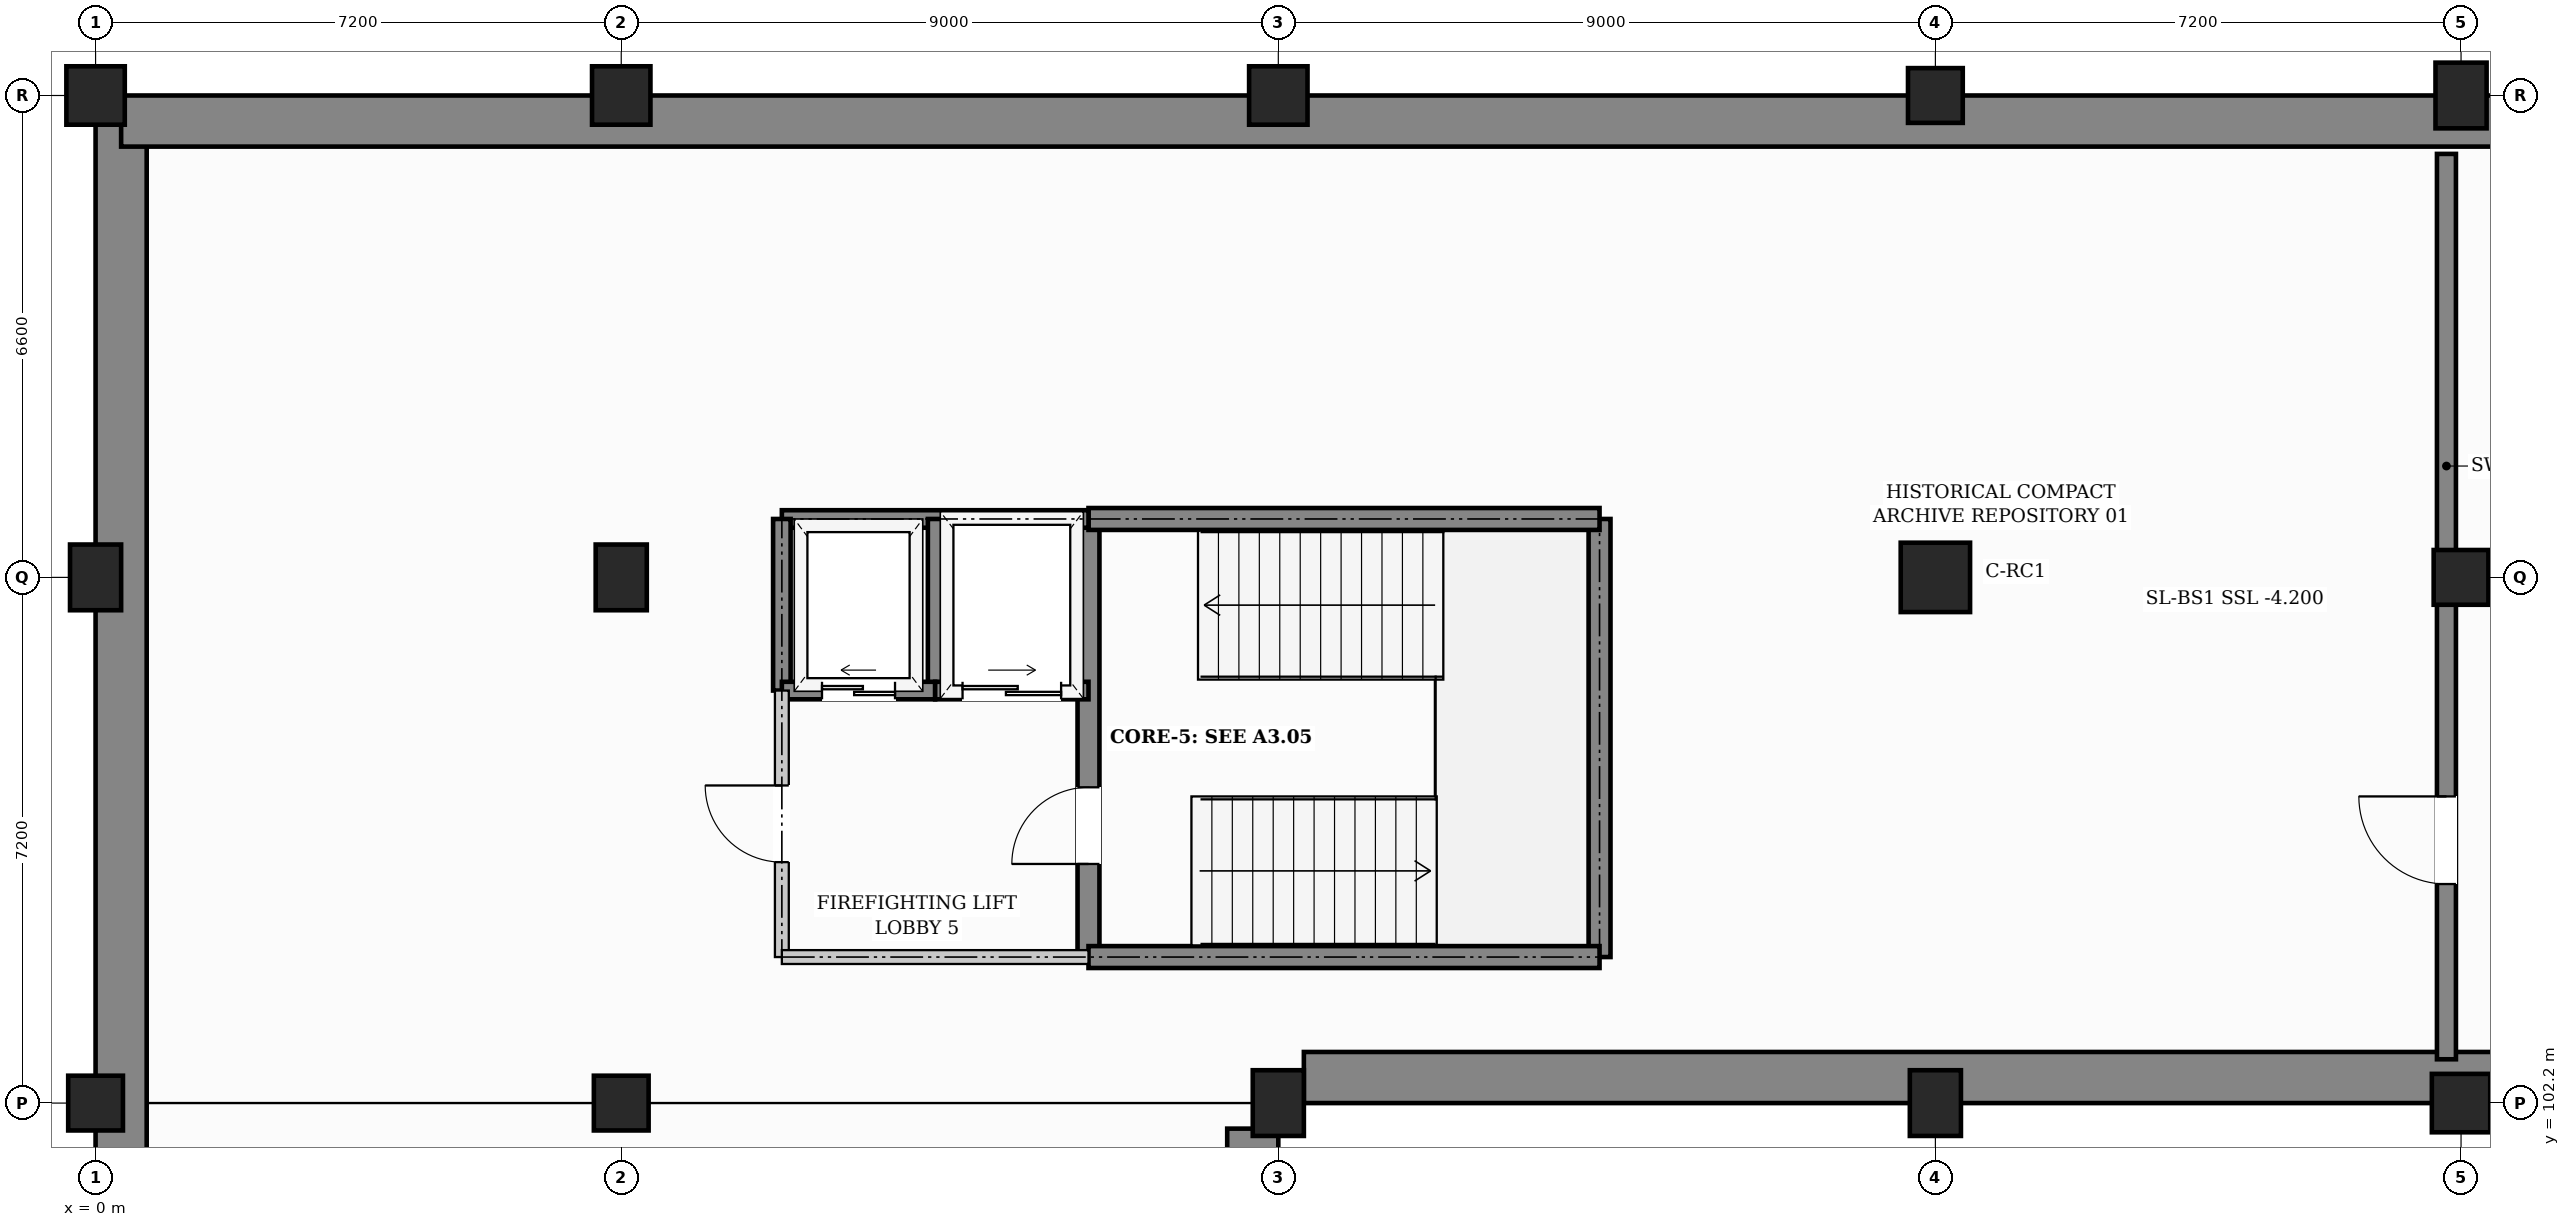
"""IFC4 building model, lengths in metres.
Left out: names, types, materials, properties, quantities, classifications, styles, units other than length and angle.
Written with IfcOpenShell. Run it as: python <this file> out.ifc"""

import sys

from ifc_helpers import new_model, si_unit, direction, frame, frame_2d, origin, origin_2d, place, context, subcontext, project, spatial, rectangle, extrude, element, fill, save


model = new_model("IFC4")
c1 = context("Model", 3, precision=1e-05, world=origin(), true_north=direction((0.0, 1.0)))
c2 = subcontext(c1, "Body", "Model", "MODEL_VIEW")
j1 = project(units=[si_unit("LENGTHUNIT", "METRE"), si_unit("PLANEANGLEUNIT", "RADIAN")], contexts=[c1])
p1 = place(None, origin())
s1 = spatial("IfcSite", under=j1, at=p1, CompositionType="ELEMENT")
p2 = place(p1, origin())
s2 = spatial("IfcBuilding", under=s1, at=p2, CompositionType="ELEMENT")
p3 = place(p2, frame((0.0, 0.0, -4.2)))
s3 = spatial("IfcBuildingStorey", under=s2, at=p3, CompositionType="ELEMENT", Elevation=-4.2)
p4 = place(p3, frame((0.0, 102.2, 0.0), z_axis=(0.0, 0.0, 1.0), x_axis=(1.0, 0.0, 0.0)))
e1 = element("IfcColumn", 1, at=p4, inside=s3, PredefinedType="COLUMN", context=c2, shape_type="SweptSolid", body=[
    extrude(rectangle(XDim=0.75, YDim=0.75, at=origin_2d()), origin(), (0.0, 0.0, 1.0), 4.2),
])
p5 = place(p3, frame((0.0, 109.4, 0.0), z_axis=(0.0, 0.0, 1.0), x_axis=(1.0, 0.0, 0.0)))
e2 = element("IfcColumn", 2, at=p5, inside=s3, PredefinedType="COLUMN", context=c2, shape_type="SweptSolid", body=[
    extrude(rectangle(XDim=0.7, YDim=0.9, at=origin_2d()), origin(), (0.0, 0.0, 1.0), 4.2),
])
p6 = place(p3, frame((0.0, 116.0, 0.0), z_axis=(0.0, 0.0, 1.0), x_axis=(1.0, 0.0, 0.0)))
e3 = element("IfcColumn", 3, at=p6, inside=s3, PredefinedType="COLUMN", context=c2, shape_type="SweptSolid", body=[
    extrude(rectangle(XDim=0.8, YDim=0.8, at=origin_2d()), origin(), (0.0, 0.0, 1.0), 4.2),
])
p7 = place(p3, frame((7.2, 102.2, 0.0), z_axis=(0.0, 0.0, 1.0), x_axis=(1.0, 0.0, 0.0)))
e4 = element("IfcColumn", 4, at=p7, inside=s3, PredefinedType="COLUMN", context=c2, shape_type="SweptSolid", body=[
    extrude(rectangle(XDim=0.75, YDim=0.75, at=origin_2d()), origin(), (0.0, 0.0, 1.0), 4.2),
])
p8 = place(p3, frame((7.2, 109.4, 0.0), z_axis=(0.0, 0.0, 1.0), x_axis=(1.0, 0.0, 0.0)))
e5 = element("IfcColumn", 5, at=p8, inside=s3, PredefinedType="COLUMN", context=c2, shape_type="SweptSolid", body=[
    extrude(rectangle(XDim=0.7, YDim=0.9, at=origin_2d()), origin(), (0.0, 0.0, 1.0), 4.2),
])
p9 = place(p3, frame((7.2, 116.0, 0.0), z_axis=(0.0, 0.0, 1.0), x_axis=(1.0, 0.0, 0.0)))
e6 = element("IfcColumn", 6, at=p9, inside=s3, PredefinedType="COLUMN", context=c2, shape_type="SweptSolid", body=[
    extrude(rectangle(XDim=0.8, YDim=0.8, at=origin_2d()), origin(), (0.0, 0.0, 1.0), 4.2),
])
p10 = place(p3, frame((16.2, 102.2, 0.0), z_axis=(0.0, 0.0, 1.0), x_axis=(1.0, 0.0, 0.0)))
e7 = element("IfcColumn", 7, at=p10, inside=s3, PredefinedType="COLUMN", context=c2, shape_type="SweptSolid", body=[
    extrude(rectangle(XDim=0.7, YDim=0.9, at=origin_2d()), origin(), (0.0, 0.0, 1.0), 4.2),
])
p11 = place(p3, frame((16.2, 116.0, 0.0), z_axis=(0.0, 0.0, 1.0), x_axis=(1.0, 0.0, 0.0)))
e8 = element("IfcColumn", 8, at=p11, inside=s3, PredefinedType="COLUMN", context=c2, shape_type="SweptSolid", body=[
    extrude(rectangle(XDim=0.8, YDim=0.8, at=origin_2d()), origin(), (0.0, 0.0, 1.0), 4.2),
])
p12 = place(p3, frame((25.2, 102.2, 0.0), z_axis=(0.0, 0.0, 1.0), x_axis=(1.0, 0.0, 0.0)))
e9 = element("IfcColumn", 9, at=p12, inside=s3, PredefinedType="COLUMN", context=c2, shape_type="SweptSolid", body=[
    extrude(rectangle(XDim=0.7, YDim=0.9, at=origin_2d()), origin(), (0.0, 0.0, 1.0), 4.2),
])
p13 = place(p3, frame((25.2, 109.4, 0.0), z_axis=(0.0, 0.0, 1.0), x_axis=(1.0, 0.0, 0.0)))
e10 = element("IfcColumn", 10, at=p13, inside=s3, PredefinedType="COLUMN", context=c2, shape_type="SweptSolid", body=[
    extrude(rectangle(XDim=0.95, YDim=0.95, at=origin_2d()), origin(), (0.0, 0.0, 1.0), 4.2),
])
p14 = place(p3, frame((25.2, 116.0, 0.0), z_axis=(0.0, 0.0, 1.0), x_axis=(1.0, 0.0, 0.0)))
e11 = element("IfcColumn", 11, at=p14, inside=s3, PredefinedType="COLUMN", context=c2, shape_type="SweptSolid", body=[
    extrude(rectangle(XDim=0.75, YDim=0.75, at=origin_2d()), origin(), (0.0, 0.0, 1.0), 4.2),
])
p15 = place(p3, frame((32.4, 102.2, 0.0), z_axis=(0.0, 0.0, 1.0), x_axis=(1.0, 0.0, 0.0)))
e12 = element("IfcColumn", 12, at=p15, inside=s3, PredefinedType="COLUMN", context=c2, shape_type="SweptSolid", body=[
    extrude(rectangle(XDim=0.8, YDim=0.8, at=origin_2d()), origin(), (0.0, 0.0, 1.0), 4.2),
])
p16 = place(p3, frame((32.4, 109.4, 0.0), z_axis=(0.0, 0.0, 1.0), x_axis=(1.0, 0.0, 0.0)))
e13 = element("IfcColumn", 13, at=p16, inside=s3, PredefinedType="COLUMN", context=c2, shape_type="SweptSolid", body=[
    extrude(rectangle(XDim=0.75, YDim=0.75, at=origin_2d()), origin(), (0.0, 0.0, 1.0), 4.2),
])
p17 = place(p3, frame((32.4, 116.0, 0.0), z_axis=(0.0, 0.0, 1.0), x_axis=(1.0, 0.0, 0.0)))
e14 = element("IfcColumn", 14, at=p17, inside=s3, PredefinedType="COLUMN", context=c2, shape_type="SweptSolid", body=[
    extrude(rectangle(XDim=0.7, YDim=0.9, at=origin_2d()), origin(), (0.0, 0.0, 1.0), 4.2),
])
p18 = place(p3, frame((0.35, 0.35, 0.0), z_axis=(0.0, 0.0, 1.0), x_axis=(0.0, 1.0, 0.0)))
e15 = element("IfcWall", 15, at=p18, inside=s3, PredefinedType="SOLIDWALL", context=c2, shape_type="SweptSolid", body=[
    extrude(rectangle(XDim=115.3, YDim=0.7, at=frame_2d((57.65, 0.0))), origin(), (0.0, 0.0, 1.0), 3.84),
])
p19 = place(p3, frame((0.35, 115.65, 0.0), z_axis=(0.0, 0.0, 1.0), x_axis=(1.0, 0.0, 0.0)))
e16 = element("IfcWall", 16, at=p19, inside=s3, PredefinedType="SOLIDWALL", context=c2, shape_type="SweptSolid", body=[
    extrude(rectangle(XDim=65.875, YDim=0.7, at=frame_2d((32.938, 0.0))), origin(), (0.0, 0.0, 1.0), 3.84),
])
p20 = place(p3, frame((57.25, 102.55, 0.0), z_axis=(0.0, 0.0, 1.0), x_axis=(-1.0, 0.0, 0.0)))
e17 = element("IfcWall", 17, at=p20, inside=s3, PredefinedType="SOLIDWALL", context=c2, shape_type="SweptSolid", body=[
    extrude(rectangle(XDim=40.7, YDim=0.7, at=frame_2d((20.35, 0.0))), origin(), (0.0, 0.0, 1.0), 3.84),
])
p21 = place(p3, frame((15.85, 101.85, 0.0), z_axis=(0.0, 0.0, 1.0), x_axis=(0.0, -1.0, 0.0)))
e18 = element("IfcWall", 18, at=p21, inside=s3, PredefinedType="SOLIDWALL", context=c2, shape_type="SweptSolid", body=[
    extrude(rectangle(XDim=38.9, YDim=0.7, at=frame_2d((19.45, 0.0))), origin(), (0.0, 0.0, 1.0), 3.84),
])
p22 = place(p3, frame((13.6, 104.2, 0.0), z_axis=(0.0, 0.0, 1.0), x_axis=(0.0, 1.0, 0.0)))
e19 = element("IfcWall", 19, at=p22, inside=s3, PredefinedType="SHEAR", context=c2, shape_type="SweptSolid", body=[
    extrude(rectangle(XDim=6.0, YDim=0.3, at=frame_2d((3.0, 0.0))), origin(), (0.0, 0.0, 1.0), 3.84),
])
p23 = place(p22, frame((1.275, 0.0, 0.0)))
e20 = element("IfcOpeningElement", 20, at=p23, cuts=e19, PredefinedType="OPENING", context=c2, shape_type="SweptSolid", body=[
    extrude(rectangle(XDim=1.05, YDim=2.15, at=frame_2d((0.525, 1.075))), frame((0.0, 0.16, 0.0), z_axis=(0.0, -1.0, 0.0), x_axis=(1.0, 0.0, 0.0)), (0.0, 0.0, 1.0), 0.32),
])
p24 = place(p3, frame((20.6, 104.2, 0.0), z_axis=(0.0, 0.0, 1.0), x_axis=(0.0, 1.0, 0.0)))
e21 = element("IfcWall", 21, at=p24, inside=s3, PredefinedType="SHEAR", context=c2, shape_type="SweptSolid", body=[
    extrude(rectangle(XDim=6.0, YDim=0.3, at=frame_2d((3.0, 0.0))), origin(), (0.0, 0.0, 1.0), 3.84),
])
for number, where, z_axis, x_axis in (
    (22, (13.6, 104.2, 0.0), (0.0, 0.0, 1.0), (1.0, 0.0, 0.0)),
    (23, (13.6, 110.2, 0.0), (0.0, 0.0, 1.0), (1.0, 0.0, 0.0)),
):
    element("IfcWall", number, at=place(p3, frame(where, z_axis=z_axis, x_axis=x_axis)), inside=s3, PredefinedType="SHEAR", context=c2, shape_type="SweptSolid", body=[
        extrude(rectangle(XDim=7.0, YDim=0.3, at=frame_2d((3.5, 0.0))), origin(), (0.0, 0.0, 1.0), 3.84),
    ])
p25 = place(p3, frame((9.4, 110.2, 0.0), z_axis=(0.0, 0.0, 1.0), x_axis=(1.0, 0.0, 0.0)))
e24 = element("IfcWall", 24, at=p25, inside=s3, PredefinedType="SHEAR", context=c2, shape_type="SweptSolid", body=[
    extrude(rectangle(XDim=4.2, YDim=0.24, at=frame_2d((2.1, 0.0))), origin(), (0.0, 0.0, 1.0), 3.84),
])
p26 = place(p3, frame((9.4, 107.85, 0.0), z_axis=(0.0, 0.0, 1.0), x_axis=(0.0, 1.0, 0.0)))
e25 = element("IfcWall", 25, at=p26, inside=s3, PredefinedType="SHEAR", context=c2, shape_type="SweptSolid", body=[
    extrude(rectangle(XDim=2.35, YDim=0.24, at=frame_2d((1.175, 0.0))), origin(), (0.0, 0.0, 1.0), 3.84),
])
p27 = place(p3, frame((11.5, 107.85, 0.0), z_axis=(0.0, 0.0, 1.0), x_axis=(0.0, 1.0, 0.0)))
e26 = element("IfcWall", 26, at=p27, inside=s3, PredefinedType="SHEAR", context=c2, shape_type="SweptSolid", body=[
    extrude(rectangle(XDim=2.35, YDim=0.2, at=frame_2d((1.175, 0.0))), origin(), (0.0, 0.0, 1.0), 3.84),
])
p28 = place(p3, frame((9.4, 107.85, 0.0), z_axis=(0.0, 0.0, 1.0), x_axis=(1.0, 0.0, 0.0)))
e27 = element("IfcWall", 27, at=p28, inside=s3, PredefinedType="SHEAR", context=c2, shape_type="SweptSolid", body=[
    extrude(rectangle(XDim=2.1, YDim=0.24, at=frame_2d((1.05, 0.0))), origin(), (0.0, 0.0, 1.0), 3.84),
])
p29 = place(p28, frame((0.55, 0.0, 0.0)))
e28 = element("IfcOpeningElement", 28, at=p29, cuts=e27, PredefinedType="OPENING", context=c2, shape_type="SweptSolid", body=[
    extrude(rectangle(XDim=1.0, YDim=2.1, at=frame_2d((0.5, 1.05))), frame((0.0, 0.13, 0.0), z_axis=(0.0, -1.0, 0.0), x_axis=(1.0, 0.0, 0.0)), (0.0, 0.0, 1.0), 0.26),
])
p30 = place(p3, frame((11.5, 107.85, 0.0), z_axis=(0.0, 0.0, 1.0), x_axis=(1.0, 0.0, 0.0)))
e29 = element("IfcWall", 29, at=p30, inside=s3, PredefinedType="SHEAR", context=c2, shape_type="SweptSolid", body=[
    extrude(rectangle(XDim=2.1, YDim=0.24, at=frame_2d((1.05, 0.0))), origin(), (0.0, 0.0, 1.0), 3.84),
])
p31 = place(p30, frame((0.375, 0.0, 0.0)))
e30 = element("IfcOpeningElement", 30, at=p31, cuts=e29, PredefinedType="OPENING", context=c2, shape_type="SweptSolid", body=[
    extrude(rectangle(XDim=1.35, YDim=2.2, at=frame_2d((0.675, 1.1))), frame((0.0, 0.13, 0.0), z_axis=(0.0, -1.0, 0.0), x_axis=(1.0, 0.0, 0.0)), (0.0, 0.0, 1.0), 0.26),
])
p32 = place(p3, frame((9.4, 104.2, 0.0), z_axis=(0.0, 0.0, 1.0), x_axis=(0.0, 1.0, 0.0)))
e31 = element("IfcWall", 31, at=p32, inside=s3, PredefinedType="PARTITIONING", context=c2, shape_type="SweptSolid", body=[
    extrude(rectangle(XDim=3.65, YDim=0.19, at=frame_2d((1.825, 0.0))), origin(), (0.0, 0.0, 1.0), 3.84),
])
p33 = place(p32, frame((1.3, 0.0, 0.0)))
e32 = element("IfcOpeningElement", 32, at=p33, cuts=e31, PredefinedType="OPENING", context=c2, shape_type="SweptSolid", body=[
    extrude(rectangle(XDim=1.05, YDim=2.15, at=frame_2d((0.525, 1.075))), frame((0.0, 0.105, 0.0), z_axis=(0.0, -1.0, 0.0), x_axis=(1.0, 0.0, 0.0)), (0.0, 0.0, 1.0), 0.21),
])
p34 = place(p3, frame((9.4, 104.2, 0.0), z_axis=(0.0, 0.0, 1.0), x_axis=(1.0, 0.0, 0.0)))
e33 = element("IfcWall", 33, at=p34, inside=s3, PredefinedType="PARTITIONING", context=c2, shape_type="SweptSolid", body=[
    extrude(rectangle(XDim=4.2, YDim=0.19, at=frame_2d((2.1, 0.0))), origin(), (0.0, 0.0, 1.0), 3.84),
])
p35 = place(p3, frame((32.2, 102.8, 0.0), z_axis=(0.0, 0.0, 1.0), x_axis=(0.0, 1.0, 0.0)))
e34 = element("IfcWall", 34, at=p35, inside=s3, PredefinedType="SOLIDWALL", context=c2, shape_type="SweptSolid", body=[
    extrude(rectangle(XDim=12.4, YDim=0.26, at=frame_2d((6.2, 0.0))), origin(), (0.0, 0.0, 1.0), 3.14),
])
p36 = place(p35, frame((2.4, 0.0, 0.0)))
e35 = element("IfcOpeningElement", 35, at=p36, cuts=e34, PredefinedType="OPENING", context=c2, shape_type="SweptSolid", body=[
    extrude(rectangle(XDim=1.2, YDim=2.2, at=frame_2d((0.6, 1.1))), frame((0.0, 0.14, 0.0), z_axis=(0.0, -1.0, 0.0), x_axis=(1.0, 0.0, 0.0)), (0.0, 0.0, 1.0), 0.28),
])
p37 = place(p23, origin())
e36 = element("IfcDoor", 36, at=p37, inside=s3, OperationType="SINGLE_SWING_LEFT", PredefinedType="DOOR", context=c2, shape_type="SweptSolid", body=[
    extrude(rectangle(XDim=1.05, YDim=2.15, at=frame_2d((0.525, 1.075))), frame((0.0, 0.025, 0.0), z_axis=(0.0, -1.0, 0.0), x_axis=(1.0, 0.0, 0.0)), (0.0, 0.0, 1.0), 0.05),
])
fill(e20, e36)
p38 = place(p29, origin())
e37 = element("IfcDoor", 37, at=p38, inside=s3, OperationType="SLIDING_TO_LEFT", PredefinedType="DOOR", context=c2, shape_type="SweptSolid", body=[
    extrude(rectangle(XDim=1.0, YDim=2.1, at=frame_2d((0.5, 1.05))), frame((0.0, 0.025, 0.0), z_axis=(0.0, -1.0, 0.0), x_axis=(1.0, 0.0, 0.0)), (0.0, 0.0, 1.0), 0.05),
])
fill(e28, e37)
p39 = place(p31, origin())
e38 = element("IfcDoor", 38, at=p39, inside=s3, OperationType="SLIDING_TO_RIGHT", PredefinedType="DOOR", context=c2, shape_type="SweptSolid", body=[
    extrude(rectangle(XDim=1.35, YDim=2.2, at=frame_2d((0.675, 1.1))), frame((0.0, 0.025, 0.0), z_axis=(0.0, -1.0, 0.0), x_axis=(1.0, 0.0, 0.0)), (0.0, 0.0, 1.0), 0.05),
])
fill(e30, e38)
p40 = place(p33, origin())
e39 = element("IfcDoor", 39, at=p40, inside=s3, OperationType="SINGLE_SWING_RIGHT", PredefinedType="DOOR", context=c2, shape_type="SweptSolid", body=[
    extrude(rectangle(XDim=1.05, YDim=2.15, at=frame_2d((0.525, 1.075))), frame((0.0, 0.025, 0.0), z_axis=(0.0, -1.0, 0.0), x_axis=(1.0, 0.0, 0.0)), (0.0, 0.0, 1.0), 0.05),
])
fill(e32, e39)
p41 = place(p36, origin())
e40 = element("IfcDoor", 40, at=p41, inside=s3, OperationType="SINGLE_SWING_RIGHT", PredefinedType="DOOR", context=c2, shape_type="SweptSolid", body=[
    extrude(rectangle(XDim=1.2, YDim=2.2, at=frame_2d((0.6, 1.1))), frame((0.0, 0.025, 0.0), z_axis=(0.0, -1.0, 0.0), x_axis=(1.0, 0.0, 0.0)), (0.0, 0.0, 1.0), 0.05),
])
fill(e35, e40)
save(model, sys.argv[1])
